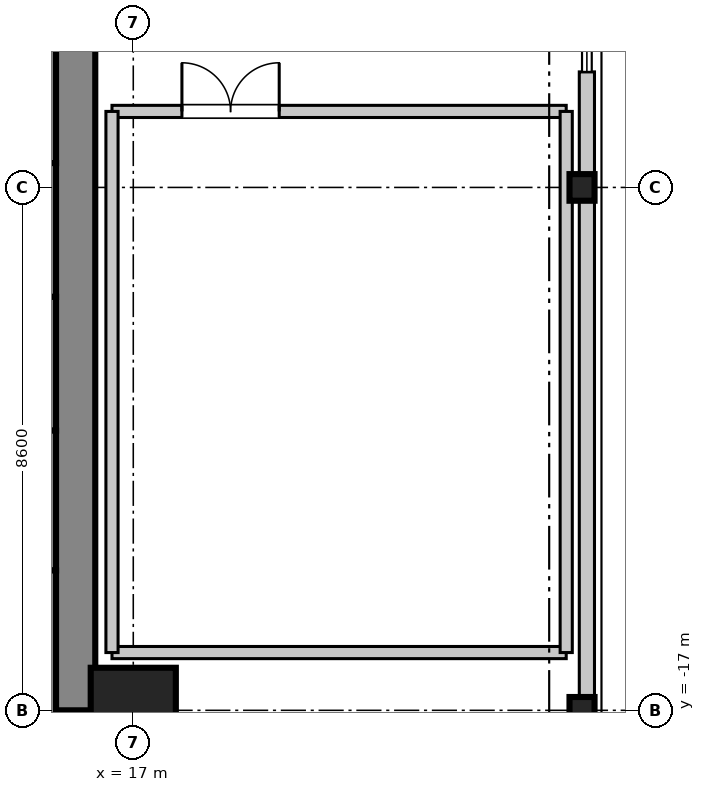
"""IFC4 building model, lengths in metres.
Left out: names, types, materials, properties, quantities, classifications, styles, units other than length and angle.
Written with IfcOpenShell. Run it as: python <this file> out.ifc"""

import sys

from ifc_helpers import new_model, si_unit, direction, frame, frame_2d, origin, origin_2d, place, context, subcontext, project, spatial, rectangle, i_section, extrude, source, transform, mapped, element, fill, save


model = new_model("IFC4")
c1 = context("Model", 3, precision=1e-05, world=origin(), true_north=direction((0.0, 1.0)))
c2 = subcontext(c1, "Body", "Model", "MODEL_VIEW")
j1 = project(units=[si_unit("LENGTHUNIT", "METRE"), si_unit("PLANEANGLEUNIT", "RADIAN")], contexts=[c1])
p1 = place(None, origin())
s1 = spatial("IfcSite", under=j1, at=p1, CompositionType="ELEMENT")
p2 = place(p1, origin())
s2 = spatial("IfcBuilding", under=s1, at=p2, CompositionType="ELEMENT")
p3 = place(p2, frame((0.0, 0.0, 83.5)))
s3 = spatial("IfcBuildingStorey", under=s2, at=p3, CompositionType="ELEMENT", Elevation=83.5)
m1 = source(origin(), c2, "Body", "SweptSolid", [
    extrude(rectangle(XDim=1.4, YDim=1.4, at=origin_2d()), origin(), (0.0, 0.0, 1.0), 4.755),
])
p4 = place(p3, frame((17.0, -17.0, 0.0), z_axis=(0.0, 0.0, 1.0), x_axis=(1.0, 0.0, 0.0)))
e1 = element("IfcColumn", 1, at=p4, inside=s3, PredefinedType="COLUMN", context=c2, shape_type="MappedRepresentation", body=[
    mapped(m1, transform((0.0, 0.0, 0.0), scale=1.0)),
])
m2 = source(origin(), c2, "Body", "SweptSolid", [
    extrude(i_section(OverallWidth=0.412, OverallDepth=0.438, WebThickness=0.023, FlangeThickness=0.036, at=origin_2d()), origin(), (0.0, 0.0, 1.0), 4.694),
])
for number, where, z_axis, x_axis in (
    (2, (24.38, -17.0, 0.0), (-0.128, 0.0, 0.992), (0.0, -1.0, 0.0)),
    (3, (24.38, -8.4, 0.0), (-0.128, 0.0, 0.992), (0.0, -1.0, 0.0)),
):
    element("IfcColumn", number, at=place(p3, frame(where, z_axis=z_axis, x_axis=x_axis)), inside=s3, PredefinedType="COLUMN", context=c2, shape_type="MappedRepresentation", body=[
        mapped(m2, transform((0.0, 0.0, 0.0), scale=1.0)),
    ])
m3 = source(origin(), c2, "Body", "SweptSolid", [
    extrude(rectangle(XDim=11.6, YDim=0.65, at=frame_2d((5.8, 0.0))), origin(), (0.0, 0.0, 1.0), 4.53),
])
p5 = place(p3, frame((16.05, -17.0, 0.0), z_axis=(0.0, 0.0, 1.0), x_axis=(0.0, 1.0, 0.0)))
e4 = element("IfcWall", 4, at=p5, inside=s3, PredefinedType="SHEAR", context=c2, shape_type="MappedRepresentation", body=[
    mapped(m3, transform((0.0, 0.0, 0.0), scale=1.0)),
])
m4 = source(origin(), c2, "Body", "SweptSolid", [
    extrude(rectangle(XDim=2.36, YDim=0.22, at=frame_2d((1.18, 0.0))), origin(), (0.0, 0.0, 1.0), 4.53),
])
p6 = place(p3, frame((15.62, -8.0, 0.0), z_axis=(0.0, 0.0, 1.0), x_axis=(0.0, 1.0, 0.0)))
e5 = element("IfcWall", 5, at=p6, inside=s3, PredefinedType="SHEAR", context=c2, shape_type="MappedRepresentation", body=[
    mapped(m4, transform((0.0, 0.0, 0.0), scale=1.0)),
])
m5 = source(origin(), c2, "Body", "SweptSolid", [
    extrude(rectangle(XDim=2.2, YDim=0.22, at=frame_2d((1.1, 0.0))), origin(), (0.0, 0.0, 1.0), 4.53),
])
for number, where, z_axis, x_axis in (
    (6, (15.62, -10.2, 0.0), (0.0, 0.0, 1.0), (0.0, 1.0, 0.0)),
    (7, (15.62, -12.4, 0.0), (0.0, 0.0, 1.0), (0.0, 1.0, 0.0)),
):
    element("IfcWall", number, at=place(p3, frame(where, z_axis=z_axis, x_axis=x_axis)), inside=s3, PredefinedType="SHEAR", context=c2, shape_type="MappedRepresentation", body=[
        mapped(m5, transform((0.0, 0.0, 0.0), scale=1.0)),
    ])
m6 = source(origin(), c2, "Body", "SweptSolid", [
    extrude(rectangle(XDim=2.3, YDim=0.22, at=frame_2d((1.15, 0.0))), origin(), (0.0, 0.0, 1.0), 4.53),
])
p7 = place(p3, frame((15.62, -14.7, 0.0), z_axis=(0.0, 0.0, 1.0), x_axis=(0.0, 1.0, 0.0)))
e8 = element("IfcWall", 8, at=p7, inside=s3, PredefinedType="SHEAR", context=c2, shape_type="MappedRepresentation", body=[
    mapped(m6, transform((0.0, 0.0, 0.0), scale=1.0)),
])
m7 = source(origin(), c2, "Body", "SweptSolid", [
    extrude(rectangle(XDim=2.61, YDim=0.22, at=frame_2d((1.305, 0.0))), origin(), (0.0, 0.0, 1.0), 4.53),
])
p8 = place(p3, frame((15.62, -17.31, 0.0), z_axis=(0.0, 0.0, 1.0), x_axis=(0.0, 1.0, 0.0)))
e9 = element("IfcWall", 9, at=p8, inside=s3, PredefinedType="SHEAR", context=c2, shape_type="MappedRepresentation", body=[
    mapped(m7, transform((0.0, 0.0, 0.0), scale=1.0)),
])
m8 = source(origin(), c2, "Body", "SweptSolid", [
    extrude(rectangle(XDim=15.16, YDim=0.25, at=frame_2d((7.58, 0.0))), origin(), (0.0, 0.0, 1.0), 4.01),
])
p9 = place(p3, frame((24.46, -21.66, 0.0), z_axis=(0.0, 0.0, 1.0), x_axis=(0.0, 1.0, 0.0)))
e10 = element("IfcWall", 10, at=p9, inside=s3, PredefinedType="STANDARD", context=c2, shape_type="MappedRepresentation", body=[
    mapped(m8, transform((0.0, 0.0, 0.0), scale=1.0)),
])
m9 = source(origin(), c2, "Body", "SweptSolid", [
    extrude(rectangle(XDim=7.47, YDim=0.2, at=frame_2d((3.735, 0.0))), origin(), (0.0, 0.0, 1.0), 3.4),
])
p10 = place(p3, frame((16.65, -16.05, 0.0), z_axis=(0.0, 0.0, 1.0), x_axis=(1.0, 0.0, 0.0)))
e11 = element("IfcWall", 11, at=p10, inside=s3, PredefinedType="PARTITIONING", context=c2, shape_type="MappedRepresentation", body=[
    mapped(m9, transform((0.0, 0.0, 0.0), scale=1.0)),
])
p11 = place(p3, frame((16.65, -7.15, 0.0), z_axis=(0.0, 0.0, 1.0), x_axis=(1.0, 0.0, 0.0)))
e12 = element("IfcWall", 12, at=p11, inside=s3, PredefinedType="PARTITIONING", context=c2, shape_type="MappedRepresentation", body=[
    mapped(m9, transform((0.0, 0.0, 0.0), scale=1.0)),
])
p12 = place(p11, frame((1.15, 0.0, 0.0)))
e13 = element("IfcOpeningElement", 13, at=p12, cuts=e12, PredefinedType="OPENING", context=c2, shape_type="SweptSolid", body=[
    extrude(rectangle(XDim=1.6, YDim=2.15, at=frame_2d((0.8, 1.075))), frame((0.0, 0.11, 0.0), z_axis=(0.0, -1.0, 0.0), x_axis=(1.0, 0.0, 0.0)), (0.0, 0.0, 1.0), 0.22),
])
m10 = source(origin(), c2, "Body", "SweptSolid", [
    extrude(rectangle(XDim=8.9, YDim=0.2, at=frame_2d((4.45, 0.0))), origin(), (0.0, 0.0, 1.0), 3.4),
])
for number, where, z_axis, x_axis in (
    (14, (16.65, -16.05, 0.0), (0.0, 0.0, 1.0), (0.0, 1.0, 0.0)),
    (15, (24.12, -16.05, 0.0), (0.0, 0.0, 1.0), (0.0, 1.0, 0.0)),
):
    element("IfcWall", number, at=place(p3, frame(where, z_axis=z_axis, x_axis=x_axis)), inside=s3, PredefinedType="PARTITIONING", context=c2, shape_type="MappedRepresentation", body=[
        mapped(m10, transform((0.0, 0.0, 0.0), scale=1.0)),
    ])
m11 = source(origin(), c2, "Body", "SweptSolid", [
    extrude(rectangle(XDim=1.6, YDim=2.15, at=frame_2d((0.8, 1.075))), frame((0.0, 0.025, 0.0), z_axis=(0.0, -1.0, 0.0), x_axis=(1.0, 0.0, 0.0)), (0.0, 0.0, 1.0), 0.05),
])
p13 = place(p12, frame((1.6, 0.0, 0.0), z_axis=(0.0, 0.0, 1.0), x_axis=(-1.0, 0.0, 0.0)))
e16 = element("IfcDoor", 16, at=p13, inside=s3, OperationType="DOUBLE_DOOR_SINGLE_SWING", PredefinedType="DOOR", context=c2, shape_type="MappedRepresentation", body=[
    mapped(m11, transform((0.0, 0.0, 0.0), scale=1.0)),
])
fill(e13, e16)
save(model, sys.argv[1])
